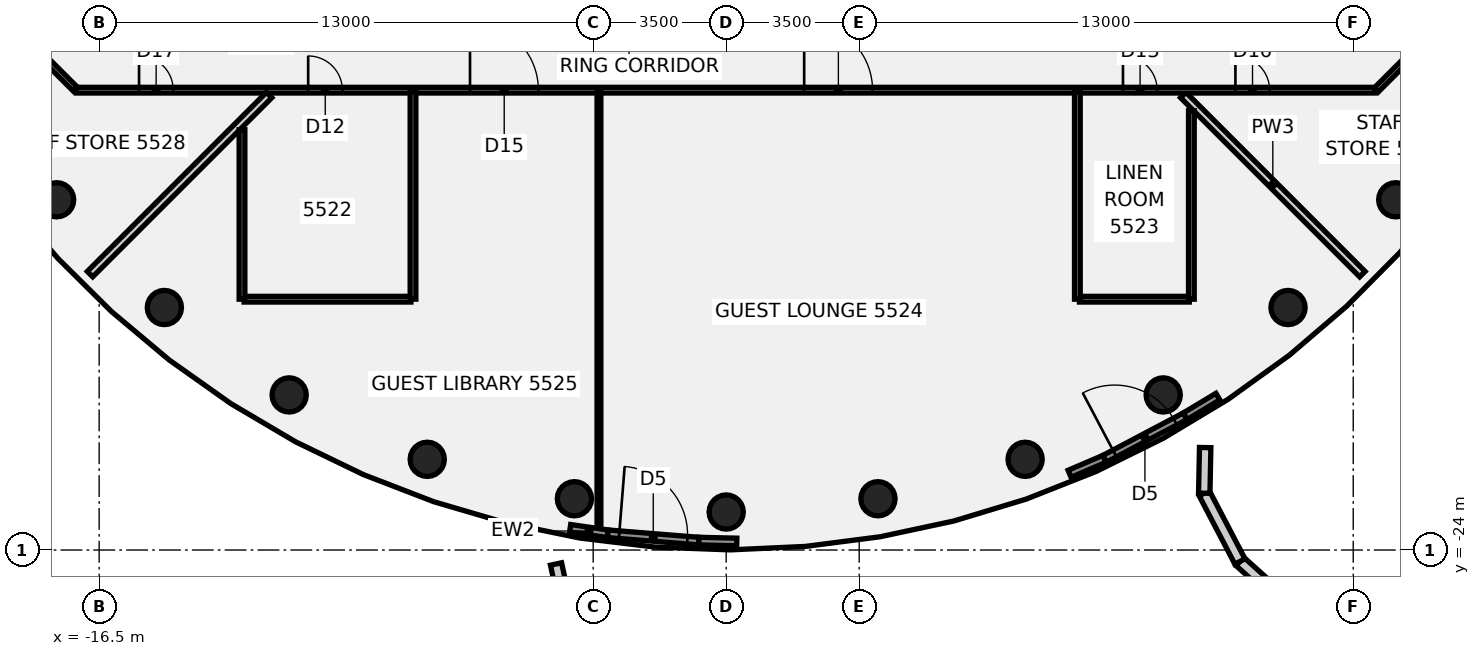
"""IFC4 building model, lengths in metres.
Left out: names, types, materials, properties, quantities, classifications, styles, units other than length and angle.
Written with IfcOpenShell. Run it as: python <this file> out.ifc"""

import sys

from ifc_helpers import new_model, si_unit, direction, frame, frame_2d, origin, origin_2d, place, context, subcontext, project, spatial, rectangle, circle, extrude, element, fill, save


model = new_model("IFC4")
c1 = context("Model", 3, precision=1e-05, world=origin(), true_north=direction((0.0, 1.0)))
c2 = subcontext(c1, "Body", "Model", "MODEL_VIEW")
j1 = project(units=[si_unit("LENGTHUNIT", "METRE"), si_unit("PLANEANGLEUNIT", "RADIAN")], contexts=[c1])
p1 = place(None, origin())
s1 = spatial("IfcSite", under=j1, at=p1, CompositionType="ELEMENT")
p2 = place(p1, origin())
s2 = spatial("IfcBuilding", under=s1, at=p2, CompositionType="ELEMENT")
p3 = place(p2, frame((0.0, 0.0, 219.9)))
s3 = spatial("IfcBuildingStorey", under=s2, at=p3, CompositionType="ELEMENT", Elevation=219.9)
for number, where, z_axis, x_axis in (
    (1, (-17.619, -14.784, -0.14), (0.0, 0.0, 1.0), (1.0, 0.0, 0.0)),
    (2, (-14.784, -17.619, -0.14), (0.0, 0.0, 1.0), (1.0, 0.0, 0.0)),
    (3, (-11.5, -19.919, -0.14), (0.0, 0.0, 1.0), (1.0, 0.0, 0.0)),
    (4, (-7.866, -21.613, -0.14), (0.0, 0.0, 1.0), (1.0, 0.0, 0.0)),
    (5, (-3.994, -22.651, -0.14), (0.0, 0.0, 1.0), (1.0, 0.0, 0.0)),
    (6, (0.0, -23.0, -0.14), (0.0, 0.0, 1.0), (1.0, 0.0, 0.0)),
    (7, (3.994, -22.651, -0.14), (0.0, 0.0, 1.0), (1.0, 0.0, 0.0)),
    (8, (7.866, -21.613, -0.14), (0.0, 0.0, 1.0), (1.0, 0.0, 0.0)),
    (9, (11.5, -19.919, -0.14), (0.0, 0.0, 1.0), (1.0, 0.0, 0.0)),
    (10, (14.784, -17.619, -0.14), (0.0, 0.0, 1.0), (1.0, 0.0, 0.0)),
    (11, (17.619, -14.784, -0.14), (0.0, 0.0, 1.0), (1.0, 0.0, 0.0)),
):
    element("IfcColumn", number, at=place(p3, frame(where, z_axis=z_axis, x_axis=x_axis)), inside=s3, PredefinedType="COLUMN", context=c2, shape_type="SweptSolid", body=[
        extrude(circle(Radius=0.45, at=origin_2d()), origin(), (0.0, 0.0, 1.0), 3.6),
    ])
p4 = place(p3, frame((-18.872, -10.128, 0.0), z_axis=(0.0, 0.0, 1.0), x_axis=(0.707106781187, -0.707106781187, 0.0)))
e12 = element("IfcWall", 12, at=p4, inside=s3, PredefinedType="PARTITIONING", context=c2, shape_type="SweptSolid", body=[
    extrude(rectangle(XDim=2.465, YDim=0.15, at=frame_2d((1.232, 0.0))), origin(), (0.0, 0.0, 1.0), 2.864),
])
p5 = place(p3, frame((12.027, -12.027, 0.0), z_axis=(0.0, 0.0, 1.0), x_axis=(0.707106781187, -0.707106781187, 0.0)))
e13 = element("IfcWall", 13, at=p5, inside=s3, PredefinedType="PARTITIONING", context=c2, shape_type="SweptSolid", body=[
    extrude(rectangle(XDim=6.665, YDim=0.2, at=frame_2d((3.333, 0.0))), origin(), (0.0, 0.0, 1.0), 2.864),
])
p6 = place(p3, frame((-17.1, -11.9, 0.0), z_axis=(0.0, 0.0, 1.0), x_axis=(1.0, 0.0, 0.0)))
e14 = element("IfcWall", 14, at=p6, inside=s3, PredefinedType="PARTITIONING", context=c2, shape_type="SweptSolid", body=[
    extrude(rectangle(XDim=34.165, YDim=0.15, at=frame_2d((17.083, 0.0))), origin(), (0.0, 0.0, 1.0), 2.864),
])
p7 = place(p6, frame((6.1, 0.0, 0.0)))
e15 = element("IfcOpeningElement", 15, at=p7, cuts=e14, PredefinedType="OPENING", context=c2, shape_type="SweptSolid", body=[
    extrude(rectangle(XDim=0.9, YDim=2.1, at=frame_2d((0.45, 1.05))), frame((0.0, 0.085, 0.0), z_axis=(0.0, -1.0, 0.0), x_axis=(1.0, 0.0, 0.0)), (0.0, 0.0, 1.0), 0.17),
])
p8 = place(p6, frame((27.541, 0.0, 0.0)))
e16 = element("IfcOpeningElement", 16, at=p8, cuts=e14, PredefinedType="OPENING", context=c2, shape_type="SweptSolid", body=[
    extrude(rectangle(XDim=0.9, YDim=2.1, at=frame_2d((0.45, 1.05))), frame((0.0, 0.085, 0.0), z_axis=(0.0, -1.0, 0.0), x_axis=(1.0, 0.0, 0.0)), (0.0, 0.0, 1.0), 0.17),
])
p9 = place(p6, frame((19.152, 0.0, 0.0)))
e17 = element("IfcOpeningElement", 17, at=p9, cuts=e14, PredefinedType="OPENING", context=c2, shape_type="SweptSolid", body=[
    extrude(rectangle(XDim=1.8, YDim=2.1, at=frame_2d((0.9, 1.05))), frame((0.0, 0.085, 0.0), z_axis=(0.0, -1.0, 0.0), x_axis=(1.0, 0.0, 0.0)), (0.0, 0.0, 1.0), 0.17),
])
p10 = place(p6, frame((10.359, 0.0, 0.0)))
e18 = element("IfcOpeningElement", 18, at=p10, cuts=e14, PredefinedType="OPENING", context=c2, shape_type="SweptSolid", body=[
    extrude(rectangle(XDim=1.8, YDim=2.1, at=frame_2d((0.9, 1.05))), frame((0.0, 0.085, 0.0), z_axis=(0.0, -1.0, 0.0), x_axis=(1.0, 0.0, 0.0)), (0.0, 0.0, 1.0), 0.17),
])
p11 = place(p6, frame((30.5, 0.0, 0.0)))
e19 = element("IfcOpeningElement", 19, at=p11, cuts=e14, PredefinedType="OPENING", context=c2, shape_type="SweptSolid", body=[
    extrude(rectangle(XDim=0.9, YDim=2.1, at=frame_2d((0.45, 1.05))), frame((0.0, 0.085, 0.0), z_axis=(0.0, -1.0, 0.0), x_axis=(1.0, 0.0, 0.0)), (0.0, 0.0, 1.0), 0.17),
])
p12 = place(p6, frame((1.65, 0.0, 0.0)))
e20 = element("IfcOpeningElement", 20, at=p12, cuts=e14, PredefinedType="OPENING", context=c2, shape_type="SweptSolid", body=[
    extrude(rectangle(XDim=0.9, YDim=2.1, at=frame_2d((0.45, 1.05))), frame((0.0, 0.085, 0.0), z_axis=(0.0, -1.0, 0.0), x_axis=(1.0, 0.0, 0.0)), (0.0, 0.0, 1.0), 0.17),
])
p13 = place(p3, frame((-12.686, -17.4, 0.0), z_axis=(0.0, 0.0, 1.0), x_axis=(1.0, 0.0, 0.0)))
e21 = element("IfcWall", 21, at=p13, inside=s3, PredefinedType="PARTITIONING", context=c2, shape_type="SweptSolid", body=[
    extrude(rectangle(XDim=4.39, YDim=0.15, at=frame_2d((2.195, 0.0))), origin(), (0.0, 0.0, 1.0), 2.864),
])
p14 = place(p3, frame((9.296, -17.4, 0.0), z_axis=(0.0, 0.0, 1.0), x_axis=(1.0, 0.0, 0.0)))
e22 = element("IfcWall", 22, at=p14, inside=s3, PredefinedType="PARTITIONING", context=c2, shape_type="SweptSolid", body=[
    extrude(rectangle(XDim=2.89, YDim=0.15, at=frame_2d((1.445, 0.0))), origin(), (0.0, 0.0, 1.0), 2.864),
])
p15 = place(p3, frame((-16.74, -16.74, 0.0), z_axis=(0.0, 0.0, 1.0), x_axis=(0.707106781187, 0.707106781187, 0.0)))
e23 = element("IfcWall", 23, at=p15, inside=s3, PredefinedType="PARTITIONING", context=c2, shape_type="SweptSolid", body=[
    extrude(rectangle(XDim=6.665, YDim=0.2, at=frame_2d((3.333, 0.0))), origin(), (0.0, 0.0, 1.0), 2.864),
])
p16 = place(p3, frame((17.1, -11.9, 0.0), z_axis=(0.0, 0.0, 1.0), x_axis=(0.707106781187, 0.707106781187, 0.0)))
e24 = element("IfcWall", 24, at=p16, inside=s3, PredefinedType="PARTITIONING", context=c2, shape_type="SweptSolid", body=[
    extrude(rectangle(XDim=2.505, YDim=0.15, at=frame_2d((1.253, 0.0))), origin(), (0.0, 0.0, 1.0), 2.864),
])
p17 = place(p3, frame((-12.741, -17.4, 0.0), z_axis=(0.0, 0.0, 1.0), x_axis=(0.0, 1.0, 0.0)))
e25 = element("IfcWall", 25, at=p17, inside=s3, PredefinedType="PARTITIONING", context=c2, shape_type="SweptSolid", body=[
    extrude(rectangle(XDim=4.459, YDim=0.15, at=frame_2d((2.229, 0.0))), origin(), (0.0, 0.0, 1.0), 2.864),
])
p18 = place(p3, frame((-8.241, -17.4, 0.0), z_axis=(0.0, 0.0, 1.0), x_axis=(0.0, 1.0, 0.0)))
e26 = element("IfcWall", 26, at=p18, inside=s3, PredefinedType="PARTITIONING", context=c2, shape_type="SweptSolid", body=[
    extrude(rectangle(XDim=5.445, YDim=0.15, at=frame_2d((2.722, 0.0))), origin(), (0.0, 0.0, 1.0), 2.864),
])
p19 = place(p3, frame((-3.348, -23.442, 0.0), z_axis=(0.0, 0.0, 1.0), x_axis=(0.0, 1.0, 0.0)))
e27 = element("IfcWall", 27, at=p19, inside=s3, PredefinedType="PARTITIONING", context=c2, shape_type="SweptSolid", body=[
    extrude(rectangle(XDim=11.487, YDim=0.1, at=frame_2d((5.744, 0.0))), origin(), (0.0, 0.0, 1.0), 2.864),
])
p20 = place(p3, frame((9.241, -17.4, 0.0), z_axis=(0.0, 0.0, 1.0), x_axis=(0.0, 1.0, 0.0)))
e28 = element("IfcWall", 28, at=p20, inside=s3, PredefinedType="PARTITIONING", context=c2, shape_type="SweptSolid", body=[
    extrude(rectangle(XDim=5.445, YDim=0.15, at=frame_2d((2.722, 0.0))), origin(), (0.0, 0.0, 1.0), 2.864),
])
p21 = place(p3, frame((12.241, -17.4, 0.0), z_axis=(0.0, 0.0, 1.0), x_axis=(0.0, 1.0, 0.0)))
e29 = element("IfcWall", 29, at=p21, inside=s3, PredefinedType="PARTITIONING", context=c2, shape_type="SweptSolid", body=[
    extrude(rectangle(XDim=4.959, YDim=0.15, at=frame_2d((2.479, 0.0))), origin(), (0.0, 0.0, 1.0), 2.864),
])
p22 = place(p3, frame((-4.106, -23.428, 0.0), z_axis=(0.0, 0.0, 1.0), x_axis=(0.989625503151, -0.14367102531, 0.0)))
e30 = element("IfcWall", 30, at=p22, inside=s3, PredefinedType="SOLIDWALL", context=c2, shape_type="SweptSolid", body=[
    extrude(rectangle(XDim=1.003, YDim=0.2, at=frame_2d((0.501, 0.0))), origin(), (0.0, 0.0, 1.0), 3.46),
])
p23 = place(p3, frame((-0.724, -23.765, 0.0), z_axis=(0.0, 0.0, 1.0), x_axis=(0.999743717166, -0.022638462551, 0.0)))
e31 = element("IfcWall", 31, at=p23, inside=s3, PredefinedType="SOLIDWALL", context=c2, shape_type="SweptSolid", body=[
    extrude(rectangle(XDim=1.003, YDim=0.2, at=frame_2d((0.501, 0.0))), origin(), (0.0, 0.0, 1.0), 3.46),
])
p24 = place(p3, frame((-3.114, -23.572, 0.0), z_axis=(0.0, 0.0, 1.0), x_axis=(0.996768164135, -0.080331979724, 0.0)))
e32 = element("IfcWall", 32, at=p24, inside=s3, PredefinedType="SOLIDWALL", context=c2, shape_type="SweptSolid", body=[
    extrude(rectangle(XDim=2.398, YDim=0.2, at=frame_2d((1.199, 0.0))), origin(), (0.0, 0.0, 1.0), 3.46),
])
p25 = place(p24, frame((0.299, 0.0, 0.0)))
e33 = element("IfcOpeningElement", 33, at=p25, cuts=e32, PredefinedType="OPENING", context=c2, shape_type="SweptSolid", body=[
    extrude(rectangle(XDim=1.8, YDim=2.4, at=frame_2d((0.9, 1.2))), frame((0.0, 0.11, 0.0), z_axis=(0.0, -1.0, 0.0), x_axis=(1.0, 0.0, 0.0)), (0.0, 0.0, 1.0), 0.22),
])
p26 = place(p3, frame((9.036, -21.994, 0.0), z_axis=(0.0, 0.0, 1.0), x_axis=(0.919346402996, 0.393449096197, 0.0)))
e34 = element("IfcWall", 34, at=p26, inside=s3, PredefinedType="SOLIDWALL", context=c2, shape_type="SweptSolid", body=[
    extrude(rectangle(XDim=1.003, YDim=0.2, at=frame_2d((0.501, 0.0))), origin(), (0.0, 0.0, 1.0), 3.46),
])
p27 = place(p3, frame((12.079, -20.48, 0.0), z_axis=(0.0, 0.0, 1.0), x_axis=(0.856762282609, 0.515711538652, 0.0)))
e35 = element("IfcWall", 35, at=p27, inside=s3, PredefinedType="SOLIDWALL", context=c2, shape_type="SweptSolid", body=[
    extrude(rectangle(XDim=1.004, YDim=0.2, at=frame_2d((0.502, 0.0))), origin(), (0.0, 0.0, 1.0), 3.46),
])
p28 = place(p3, frame((9.958, -21.599, 0.0), z_axis=(0.0, 0.0, 1.0), x_axis=(0.884398759304, 0.466732080043, 0.0)))
e36 = element("IfcWall", 36, at=p28, inside=s3, PredefinedType="SOLIDWALL", context=c2, shape_type="SweptSolid", body=[
    extrude(rectangle(XDim=2.398, YDim=0.2, at=frame_2d((1.199, 0.0))), origin(), (0.0, 0.0, 1.0), 3.46),
])
p29 = place(p28, frame((0.3, 0.0, 0.0)))
e37 = element("IfcOpeningElement", 37, at=p29, cuts=e36, PredefinedType="OPENING", context=c2, shape_type="SweptSolid", body=[
    extrude(rectangle(XDim=1.8, YDim=2.4, at=frame_2d((0.9, 1.2))), frame((0.0, 0.11, 0.0), z_axis=(0.0, -1.0, 0.0), x_axis=(1.0, 0.0, 0.0)), (0.0, 0.0, 1.0), 0.22),
])
p30 = place(p3, frame((-4.478, -24.367, 0.0), z_axis=(0.0, 0.0, 1.0), x_axis=(0.212303366931, -0.977203806987, 0.0)))
e38 = element("IfcWall", 38, at=p30, inside=s3, PredefinedType="PARAPET", context=c2, shape_type="SweptSolid", body=[
    extrude(rectangle(XDim=2.007, YDim=0.3, at=frame_2d((1.003, 0.0))), origin(), (0.0, 0.0, 1.0), 1.1),
])
p31 = place(p3, frame((20.406, -30.508, 0.0), z_axis=(0.0, 0.0, 1.0), x_axis=(-0.742848796998, 0.669459233112, 0.0)))
e39 = element("IfcWall", 39, at=p31, inside=s3, PredefinedType="PARAPET", context=c2, shape_type="SweptSolid", body=[
    extrude(rectangle(XDim=9.271, YDim=0.3, at=frame_2d((4.636, 0.0))), origin(), (0.0, 0.0, 1.0), 1.1),
])
p32 = place(p3, frame((13.518, -24.301, 0.0), z_axis=(0.0, 0.0, 1.0), x_axis=(-0.463191833095, 0.886258046933, 0.0)))
e40 = element("IfcWall", 40, at=p32, inside=s3, PredefinedType="PARAPET", context=c2, shape_type="SweptSolid", body=[
    extrude(rectangle(XDim=2.026, YDim=0.3, at=frame_2d((1.013, 0.0))), origin(), (0.0, 0.0, 1.0), 1.1),
])
p33 = place(p3, frame((12.58, -22.505, 0.0), z_axis=(0.0, 0.0, 1.0), x_axis=(0.020113792324, 0.999797697216, 0.0)))
e41 = element("IfcWall", 41, at=p33, inside=s3, PredefinedType="PARAPET", context=c2, shape_type="SweptSolid", body=[
    extrude(rectangle(XDim=1.202, YDim=0.3, at=frame_2d((0.601, 0.0))), origin(), (0.0, 0.0, 1.0), 1.1),
])
p34 = place(p7, frame((0.9, 0.0, 0.0), z_axis=(0.0, 0.0, 1.0), x_axis=(-1.0, 0.0, 0.0)))
e42 = element("IfcDoor", 42, at=p34, inside=s3, OperationType="SINGLE_SWING_LEFT", PredefinedType="DOOR", context=c2, shape_type="SweptSolid", body=[
    extrude(rectangle(XDim=0.9, YDim=2.1, at=frame_2d((0.45, 1.05))), frame((0.0, 0.025, 0.0), z_axis=(0.0, -1.0, 0.0), x_axis=(1.0, 0.0, 0.0)), (0.0, 0.0, 1.0), 0.05),
])
fill(e15, e42)
p35 = place(p8, frame((0.9, 0.0, 0.0), z_axis=(0.0, 0.0, 1.0), x_axis=(-1.0, 0.0, 0.0)))
e43 = element("IfcDoor", 43, at=p35, inside=s3, OperationType="SINGLE_SWING_RIGHT", PredefinedType="DOOR", context=c2, shape_type="SweptSolid", body=[
    extrude(rectangle(XDim=0.9, YDim=2.1, at=frame_2d((0.45, 1.05))), frame((0.0, 0.025, 0.0), z_axis=(0.0, -1.0, 0.0), x_axis=(1.0, 0.0, 0.0)), (0.0, 0.0, 1.0), 0.05),
])
fill(e16, e43)
p36 = place(p9, origin())
e44 = element("IfcDoor", 44, at=p36, inside=s3, OperationType="DOUBLE_DOOR_SINGLE_SWING", PredefinedType="DOOR", context=c2, shape_type="SweptSolid", body=[
    extrude(rectangle(XDim=1.8, YDim=2.1, at=frame_2d((0.9, 1.05))), frame((0.0, 0.025, 0.0), z_axis=(0.0, -1.0, 0.0), x_axis=(1.0, 0.0, 0.0)), (0.0, 0.0, 1.0), 0.05),
])
fill(e17, e44)
p37 = place(p10, frame((1.8, 0.0, 0.0), z_axis=(0.0, 0.0, 1.0), x_axis=(-1.0, 0.0, 0.0)))
e45 = element("IfcDoor", 45, at=p37, inside=s3, OperationType="DOUBLE_DOOR_SINGLE_SWING", PredefinedType="DOOR", context=c2, shape_type="SweptSolid", body=[
    extrude(rectangle(XDim=1.8, YDim=2.1, at=frame_2d((0.9, 1.05))), frame((0.0, 0.025, 0.0), z_axis=(0.0, -1.0, 0.0), x_axis=(1.0, 0.0, 0.0)), (0.0, 0.0, 1.0), 0.05),
])
fill(e18, e45)
p38 = place(p11, frame((0.9, 0.0, 0.0), z_axis=(0.0, 0.0, 1.0), x_axis=(-1.0, 0.0, 0.0)))
e46 = element("IfcDoor", 46, at=p38, inside=s3, OperationType="SINGLE_SWING_RIGHT", PredefinedType="DOOR", context=c2, shape_type="SweptSolid", body=[
    extrude(rectangle(XDim=0.9, YDim=2.1, at=frame_2d((0.45, 1.05))), frame((0.0, 0.025, 0.0), z_axis=(0.0, -1.0, 0.0), x_axis=(1.0, 0.0, 0.0)), (0.0, 0.0, 1.0), 0.05),
])
fill(e19, e46)
p39 = place(p12, frame((0.9, 0.0, 0.0), z_axis=(0.0, 0.0, 1.0), x_axis=(-1.0, 0.0, 0.0)))
e47 = element("IfcDoor", 47, at=p39, inside=s3, OperationType="SINGLE_SWING_LEFT", PredefinedType="DOOR", context=c2, shape_type="SweptSolid", body=[
    extrude(rectangle(XDim=0.9, YDim=2.1, at=frame_2d((0.45, 1.05))), frame((0.0, 0.025, 0.0), z_axis=(0.0, -1.0, 0.0), x_axis=(1.0, 0.0, 0.0)), (0.0, 0.0, 1.0), 0.05),
])
fill(e20, e47)
p40 = place(p25, origin())
e48 = element("IfcDoor", 48, at=p40, inside=s3, OperationType="SINGLE_SWING_LEFT", PredefinedType="DOOR", context=c2, shape_type="SweptSolid", body=[
    extrude(rectangle(XDim=1.8, YDim=2.4, at=frame_2d((0.9, 1.2))), frame((0.0, 0.025, 0.0), z_axis=(0.0, -1.0, 0.0), x_axis=(1.0, 0.0, 0.0)), (0.0, 0.0, 1.0), 0.05),
])
fill(e33, e48)
p41 = place(p29, frame((1.8, 0.0, 0.0), z_axis=(0.0, 0.0, 1.0), x_axis=(-1.0, 0.0, 0.0)))
e49 = element("IfcDoor", 49, at=p41, inside=s3, OperationType="SINGLE_SWING_LEFT", PredefinedType="DOOR", context=c2, shape_type="SweptSolid", body=[
    extrude(rectangle(XDim=1.8, YDim=2.4, at=frame_2d((0.9, 1.2))), frame((0.0, 0.025, 0.0), z_axis=(0.0, -1.0, 0.0), x_axis=(1.0, 0.0, 0.0)), (0.0, 0.0, 1.0), 0.05),
])
fill(e37, e49)
save(model, sys.argv[1])
